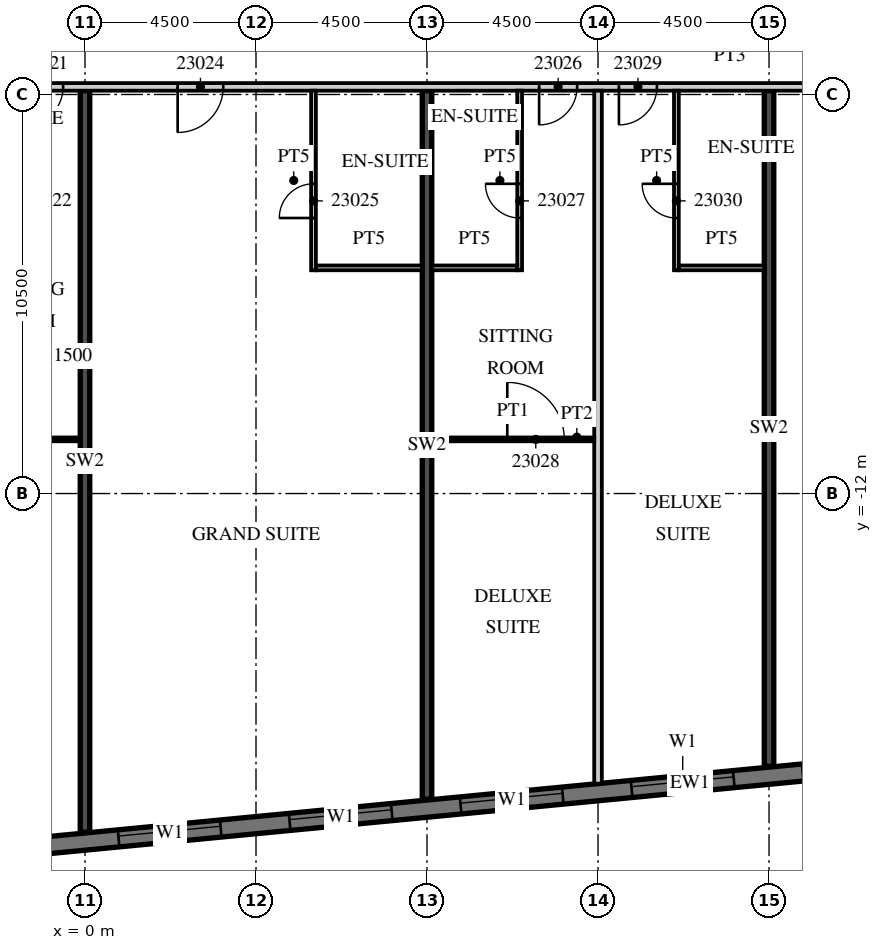
"""IFC4 building model, lengths in metres.
Left out: names, types, materials, properties, quantities, classifications, styles, units other than length and angle.
Written with IfcOpenShell. Run it as: python <this file> out.ifc"""

import sys

from ifc_helpers import new_model, si_unit, direction, frame, frame_2d, origin, place, context, subcontext, project, spatial, rectangle, extrude, element, fill, save


model = new_model("IFC4")
c1 = context("Model", 3, precision=1e-05, world=origin(), true_north=direction((0.0, 1.0)))
c2 = subcontext(c1, "Body", "Model", "MODEL_VIEW")
j1 = project(units=[si_unit("LENGTHUNIT", "METRE"), si_unit("PLANEANGLEUNIT", "RADIAN")], contexts=[c1])
p1 = place(None, origin())
s1 = spatial("IfcSite", under=j1, at=p1, CompositionType="ELEMENT")
p2 = place(p1, origin())
s2 = spatial("IfcBuilding", under=s1, at=p2, CompositionType="ELEMENT")
p3 = place(p2, frame((0.0, 0.0, 110.8)))
s3 = spatial("IfcBuildingStorey", under=s2, at=p3, CompositionType="ELEMENT", Elevation=110.8)
p4 = place(p3, frame((0.0, -20.91, 0.0), z_axis=(0.0, 0.0, 1.0), x_axis=(0.0, 1.0, 0.0)))
e1 = element("IfcWall", 1, at=p4, inside=s3, PredefinedType="SHEAR", context=c2, shape_type="SweptSolid", body=[
    extrude(rectangle(XDim=19.51, YDim=0.25, at=frame_2d((9.755, 0.0))), origin(), (0.0, 0.0, 1.0), 3.3),
])
p5 = place(p3, frame((9.0, -20.044, 0.0), z_axis=(0.0, 0.0, 1.0), x_axis=(0.0, 1.0, 0.0)))
e2 = element("IfcWall", 2, at=p5, inside=s3, PredefinedType="SHEAR", context=c2, shape_type="SweptSolid", body=[
    extrude(rectangle(XDim=18.644, YDim=0.25, at=frame_2d((9.322, 0.0))), origin(), (0.0, 0.0, 1.0), 3.3),
])
p6 = place(p3, frame((18.0, -19.177, 0.0), z_axis=(0.0, 0.0, 1.0), x_axis=(0.0, 1.0, 0.0)))
e3 = element("IfcWall", 3, at=p6, inside=s3, PredefinedType="SHEAR", context=c2, shape_type="SweptSolid", body=[
    extrude(rectangle(XDim=17.777, YDim=0.25, at=frame_2d((8.889, 0.0))), origin(), (0.0, 0.0, 1.0), 3.3),
])
p7 = place(p3, frame((-13.521, -22.46, 0.0), z_axis=(0.0, 0.0, 1.0), x_axis=(0.995396096335, 0.095846812164, 0.0)))
e4 = element("IfcWall", 4, at=p7, inside=s3, PredefinedType="SOLIDWALL", context=c2, shape_type="SweptSolid", body=[
    extrude(rectangle(XDim=59.151, YDim=0.45, at=frame_2d((29.575, 0.0))), origin(), (0.0, 0.0, 1.0), 3.02),
])
p8 = place(p7, frame((0.91, 0.0, 0.45)))
e5 = element("IfcOpeningElement", 5, at=p8, cuts=e4, PredefinedType="OPENING", context=c2, shape_type="SweptSolid", body=[
    extrude(rectangle(XDim=2.7, YDim=2.25, at=frame_2d((1.35, 1.125))), frame((0.0, 0.235, 0.0), z_axis=(0.0, -1.0, 0.0), x_axis=(1.0, 0.0, 0.0)), (0.0, 0.0, 1.0), 0.47),
])
p9 = place(p7, frame((5.431, 0.0, 0.45)))
e6 = element("IfcOpeningElement", 6, at=p9, cuts=e4, PredefinedType="OPENING", context=c2, shape_type="SweptSolid", body=[
    extrude(rectangle(XDim=2.7, YDim=2.25, at=frame_2d((1.35, 1.125))), frame((0.0, 0.235, 0.0), z_axis=(0.0, -1.0, 0.0), x_axis=(1.0, 0.0, 0.0)), (0.0, 0.0, 1.0), 0.47),
])
p10 = place(p7, frame((9.952, 0.0, 0.45)))
e7 = element("IfcOpeningElement", 7, at=p10, cuts=e4, PredefinedType="OPENING", context=c2, shape_type="SweptSolid", body=[
    extrude(rectangle(XDim=2.7, YDim=2.25, at=frame_2d((1.35, 1.125))), frame((0.0, 0.235, 0.0), z_axis=(0.0, -1.0, 0.0), x_axis=(1.0, 0.0, 0.0)), (0.0, 0.0, 1.0), 0.47),
])
p11 = place(p7, frame((14.473, 0.0, 0.45)))
e8 = element("IfcOpeningElement", 8, at=p11, cuts=e4, PredefinedType="OPENING", context=c2, shape_type="SweptSolid", body=[
    extrude(rectangle(XDim=2.7, YDim=2.25, at=frame_2d((1.35, 1.125))), frame((0.0, 0.235, 0.0), z_axis=(0.0, -1.0, 0.0), x_axis=(1.0, 0.0, 0.0)), (0.0, 0.0, 1.0), 0.47),
])
p12 = place(p7, frame((18.994, 0.0, 0.45)))
e9 = element("IfcOpeningElement", 9, at=p12, cuts=e4, PredefinedType="OPENING", context=c2, shape_type="SweptSolid", body=[
    extrude(rectangle(XDim=2.7, YDim=2.25, at=frame_2d((1.35, 1.125))), frame((0.0, 0.235, 0.0), z_axis=(0.0, -1.0, 0.0), x_axis=(1.0, 0.0, 0.0)), (0.0, 0.0, 1.0), 0.47),
])
p13 = place(p7, frame((23.514, 0.0, 0.45)))
e10 = element("IfcOpeningElement", 10, at=p13, cuts=e4, PredefinedType="OPENING", context=c2, shape_type="SweptSolid", body=[
    extrude(rectangle(XDim=2.7, YDim=2.25, at=frame_2d((1.35, 1.125))), frame((0.0, 0.235, 0.0), z_axis=(0.0, -1.0, 0.0), x_axis=(1.0, 0.0, 0.0)), (0.0, 0.0, 1.0), 0.47),
])
p14 = place(p7, frame((28.035, 0.0, 0.45)))
e11 = element("IfcOpeningElement", 11, at=p14, cuts=e4, PredefinedType="OPENING", context=c2, shape_type="SweptSolid", body=[
    extrude(rectangle(XDim=2.7, YDim=2.25, at=frame_2d((1.35, 1.125))), frame((0.0, 0.235, 0.0), z_axis=(0.0, -1.0, 0.0), x_axis=(1.0, 0.0, 0.0)), (0.0, 0.0, 1.0), 0.47),
])
p15 = place(p7, frame((32.556, 0.0, 0.45)))
e12 = element("IfcOpeningElement", 12, at=p15, cuts=e4, PredefinedType="OPENING", context=c2, shape_type="SweptSolid", body=[
    extrude(rectangle(XDim=2.7, YDim=2.25, at=frame_2d((1.35, 1.125))), frame((0.0, 0.235, 0.0), z_axis=(0.0, -1.0, 0.0), x_axis=(1.0, 0.0, 0.0)), (0.0, 0.0, 1.0), 0.47),
])
p16 = place(p7, frame((37.077, 0.0, 0.45)))
e13 = element("IfcOpeningElement", 13, at=p16, cuts=e4, PredefinedType="OPENING", context=c2, shape_type="SweptSolid", body=[
    extrude(rectangle(XDim=2.7, YDim=2.25, at=frame_2d((1.35, 1.125))), frame((0.0, 0.235, 0.0), z_axis=(0.0, -1.0, 0.0), x_axis=(1.0, 0.0, 0.0)), (0.0, 0.0, 1.0), 0.47),
])
p17 = place(p7, frame((41.598, 0.0, 0.45)))
e14 = element("IfcOpeningElement", 14, at=p17, cuts=e4, PredefinedType="OPENING", context=c2, shape_type="SweptSolid", body=[
    extrude(rectangle(XDim=2.7, YDim=2.25, at=frame_2d((1.35, 1.125))), frame((0.0, 0.235, 0.0), z_axis=(0.0, -1.0, 0.0), x_axis=(1.0, 0.0, 0.0)), (0.0, 0.0, 1.0), 0.47),
])
p18 = place(p7, frame((46.118, 0.0, 0.45)))
e15 = element("IfcOpeningElement", 15, at=p18, cuts=e4, PredefinedType="OPENING", context=c2, shape_type="SweptSolid", body=[
    extrude(rectangle(XDim=2.7, YDim=2.25, at=frame_2d((1.35, 1.125))), frame((0.0, 0.235, 0.0), z_axis=(0.0, -1.0, 0.0), x_axis=(1.0, 0.0, 0.0)), (0.0, 0.0, 1.0), 0.47),
])
p19 = place(p7, frame((50.639, 0.0, 0.45)))
e16 = element("IfcOpeningElement", 16, at=p19, cuts=e4, PredefinedType="OPENING", context=c2, shape_type="SweptSolid", body=[
    extrude(rectangle(XDim=2.7, YDim=2.25, at=frame_2d((1.35, 1.125))), frame((0.0, 0.235, 0.0), z_axis=(0.0, -1.0, 0.0), x_axis=(1.0, 0.0, 0.0)), (0.0, 0.0, 1.0), 0.47),
])
p20 = place(p7, frame((55.15, 0.0, 0.45)))
e17 = element("IfcOpeningElement", 17, at=p20, cuts=e4, PredefinedType="OPENING", context=c2, shape_type="SweptSolid", body=[
    extrude(rectangle(XDim=2.7, YDim=2.25, at=frame_2d((1.35, 1.125))), frame((0.0, 0.235, 0.0), z_axis=(0.0, -1.0, 0.0), x_axis=(1.0, 0.0, 0.0)), (0.0, 0.0, 1.0), 0.47),
])
p21 = place(p3, frame((-13.5, -1.3, 0.0), z_axis=(0.0, 0.0, 1.0), x_axis=(1.0, 0.0, 0.0)))
e18 = element("IfcWall", 18, at=p21, inside=s3, PredefinedType="PARTITIONING", context=c2, shape_type="SweptSolid", body=[
    extrude(rectangle(XDim=60.932, YDim=0.2, at=frame_2d((30.466, 0.0))), origin(), (0.0, 0.0, 1.0), 3.02),
])
p22 = place(p21, frame((0.575, 0.0, 0.0)))
e19 = element("IfcOpeningElement", 19, at=p22, cuts=e18, PredefinedType="OPENING", context=c2, shape_type="SweptSolid", body=[
    extrude(rectangle(XDim=1.0, YDim=2.1, at=frame_2d((0.5, 1.05))), frame((0.0, 0.11, 0.0), z_axis=(0.0, -1.0, 0.0), x_axis=(1.0, 0.0, 0.0)), (0.0, 0.0, 1.0), 0.22),
])
p23 = place(p21, frame((5.075, 0.0, 0.0)))
e20 = element("IfcOpeningElement", 20, at=p23, cuts=e18, PredefinedType="OPENING", context=c2, shape_type="SweptSolid", body=[
    extrude(rectangle(XDim=1.0, YDim=2.1, at=frame_2d((0.5, 1.05))), frame((0.0, 0.11, 0.0), z_axis=(0.0, -1.0, 0.0), x_axis=(1.0, 0.0, 0.0)), (0.0, 0.0, 1.0), 0.22),
])
p24 = place(p21, frame((11.925, 0.0, 0.0)))
e21 = element("IfcOpeningElement", 21, at=p24, cuts=e18, PredefinedType="OPENING", context=c2, shape_type="SweptSolid", body=[
    extrude(rectangle(XDim=1.0, YDim=2.1, at=frame_2d((0.5, 1.05))), frame((0.0, 0.11, 0.0), z_axis=(0.0, -1.0, 0.0), x_axis=(1.0, 0.0, 0.0)), (0.0, 0.0, 1.0), 0.22),
])
p25 = place(p21, frame((15.938, 0.0, 0.0)))
e22 = element("IfcOpeningElement", 22, at=p25, cuts=e18, PredefinedType="OPENING", context=c2, shape_type="SweptSolid", body=[
    extrude(rectangle(XDim=1.2, YDim=2.1, at=frame_2d((0.6, 1.05))), frame((0.0, 0.11, 0.0), z_axis=(0.0, -1.0, 0.0), x_axis=(1.0, 0.0, 0.0)), (0.0, 0.0, 1.0), 0.22),
])
p26 = place(p21, frame((25.45, 0.0, 0.0)))
e23 = element("IfcOpeningElement", 23, at=p26, cuts=e18, PredefinedType="OPENING", context=c2, shape_type="SweptSolid", body=[
    extrude(rectangle(XDim=1.0, YDim=2.1, at=frame_2d((0.5, 1.05))), frame((0.0, 0.11, 0.0), z_axis=(0.0, -1.0, 0.0), x_axis=(1.0, 0.0, 0.0)), (0.0, 0.0, 1.0), 0.22),
])
p27 = place(p21, frame((27.55, 0.0, 0.0)))
e24 = element("IfcOpeningElement", 24, at=p27, cuts=e18, PredefinedType="OPENING", context=c2, shape_type="SweptSolid", body=[
    extrude(rectangle(XDim=1.0, YDim=2.1, at=frame_2d((0.5, 1.05))), frame((0.0, 0.11, 0.0), z_axis=(0.0, -1.0, 0.0), x_axis=(1.0, 0.0, 0.0)), (0.0, 0.0, 1.0), 0.22),
])
p28 = place(p21, frame((33.938, 0.0, 0.0)))
e25 = element("IfcOpeningElement", 25, at=p28, cuts=e18, PredefinedType="OPENING", context=c2, shape_type="SweptSolid", body=[
    extrude(rectangle(XDim=1.2, YDim=2.1, at=frame_2d((0.6, 1.05))), frame((0.0, 0.11, 0.0), z_axis=(0.0, -1.0, 0.0), x_axis=(1.0, 0.0, 0.0)), (0.0, 0.0, 1.0), 0.22),
])
p29 = place(p21, frame((45.862, 0.0, 0.0)))
e26 = element("IfcOpeningElement", 26, at=p29, cuts=e18, PredefinedType="OPENING", context=c2, shape_type="SweptSolid", body=[
    extrude(rectangle(XDim=1.2, YDim=2.1, at=frame_2d((0.6, 1.05))), frame((0.0, 0.11, 0.0), z_axis=(0.0, -1.0, 0.0), x_axis=(1.0, 0.0, 0.0)), (0.0, 0.0, 1.0), 0.22),
])
p30 = place(p21, frame((52.425, 0.0, 0.0)))
e27 = element("IfcOpeningElement", 27, at=p30, cuts=e18, PredefinedType="OPENING", context=c2, shape_type="SweptSolid", body=[
    extrude(rectangle(XDim=1.0, YDim=2.1, at=frame_2d((0.5, 1.05))), frame((0.0, 0.11, 0.0), z_axis=(0.0, -1.0, 0.0), x_axis=(1.0, 0.0, 0.0)), (0.0, 0.0, 1.0), 0.22),
])
p31 = place(p21, frame((56.95, 0.0, 0.0)))
e28 = element("IfcOpeningElement", 28, at=p31, cuts=e18, PredefinedType="OPENING", context=c2, shape_type="SweptSolid", body=[
    extrude(rectangle(XDim=1.0, YDim=2.1, at=frame_2d((0.5, 1.05))), frame((0.0, 0.11, 0.0), z_axis=(0.0, -1.0, 0.0), x_axis=(1.0, 0.0, 0.0)), (0.0, 0.0, 1.0), 0.22),
])
p32 = place(p21, frame((59.882, 0.0, 0.0)))
e29 = element("IfcOpeningElement", 29, at=p32, cuts=e18, PredefinedType="OPENING", context=c2, shape_type="SweptSolid", body=[
    extrude(rectangle(XDim=0.9, YDim=2.1, at=frame_2d((0.45, 1.05))), frame((0.0, 0.11, 0.0), z_axis=(0.0, -1.0, 0.0), x_axis=(1.0, 0.0, 0.0)), (0.0, 0.0, 1.0), 0.22),
])
p33 = place(p3, frame((-4.4, -10.575, 0.0), z_axis=(0.0, 0.0, 1.0), x_axis=(1.0, 0.0, 0.0)))
e30 = element("IfcWall", 30, at=p33, inside=s3, PredefinedType="PARTITIONING", context=c2, shape_type="SweptSolid", body=[
    extrude(rectangle(XDim=4.275, YDim=0.1, at=frame_2d((2.137, 0.0))), origin(), (0.0, 0.0, 1.0), 3.02),
])
p34 = place(p33, frame((1.988, 0.0, 0.0)))
e31 = element("IfcOpeningElement", 31, at=p34, cuts=e30, PredefinedType="OPENING", context=c2, shape_type="SweptSolid", body=[
    extrude(rectangle(XDim=1.5, YDim=2.1, at=frame_2d((0.75, 1.05))), frame((0.0, 0.06, 0.0), z_axis=(0.0, -1.0, 0.0), x_axis=(1.0, 0.0, 0.0)), (0.0, 0.0, 1.0), 0.12),
])
p35 = place(p3, frame((6.013, -6.125, 0.0), z_axis=(0.0, 0.0, 1.0), x_axis=(0.0, 1.0, 0.0)))
e32 = element("IfcWall", 32, at=p35, inside=s3, PredefinedType="PARTITIONING", context=c2, shape_type="SweptSolid", body=[
    extrude(rectangle(XDim=4.725, YDim=0.125, at=frame_2d((2.363, 0.0))), origin(), (0.0, 0.0, 1.0), 3.02),
])
p36 = place(p35, frame((1.375, 0.0, 0.0)))
e33 = element("IfcOpeningElement", 33, at=p36, cuts=e32, PredefinedType="OPENING", context=c2, shape_type="SweptSolid", body=[
    extrude(rectangle(XDim=0.9, YDim=2.1, at=frame_2d((0.45, 1.05))), frame((0.0, 0.073, 0.0), z_axis=(0.0, -1.0, 0.0), x_axis=(1.0, 0.0, 0.0)), (0.0, 0.0, 1.0), 0.145),
])
p37 = place(p3, frame((6.075, -6.062, 0.0), z_axis=(0.0, 0.0, 1.0), x_axis=(1.0, 0.0, 0.0)))
e34 = element("IfcWall", 34, at=p37, inside=s3, PredefinedType="PARTITIONING", context=c2, shape_type="SweptSolid", body=[
    extrude(rectangle(XDim=2.8, YDim=0.125, at=frame_2d((1.4, 0.0))), origin(), (0.0, 0.0, 1.0), 3.02),
])
p38 = place(p3, frame((13.5, -19.633, 0.0), z_axis=(0.0, 0.0, 1.0), x_axis=(0.0, 1.0, 0.0)))
e35 = element("IfcWall", 35, at=p38, inside=s3, PredefinedType="PARTITIONING", context=c2, shape_type="SweptSolid", body=[
    extrude(rectangle(XDim=18.233, YDim=0.2, at=frame_2d((9.117, 0.0))), origin(), (0.0, 0.0, 1.0), 3.02),
])
p39 = place(p3, frame((11.438, -6.125, 0.0), z_axis=(0.0, 0.0, 1.0), x_axis=(0.0, 1.0, 0.0)))
e36 = element("IfcWall", 36, at=p39, inside=s3, PredefinedType="PARTITIONING", context=c2, shape_type="SweptSolid", body=[
    extrude(rectangle(XDim=4.725, YDim=0.125, at=frame_2d((2.363, 0.0))), origin(), (0.0, 0.0, 1.0), 3.02),
])
p40 = place(p39, frame((1.375, 0.0, 0.0)))
e37 = element("IfcOpeningElement", 37, at=p40, cuts=e36, PredefinedType="OPENING", context=c2, shape_type="SweptSolid", body=[
    extrude(rectangle(XDim=0.9, YDim=2.1, at=frame_2d((0.45, 1.05))), frame((0.0, 0.073, 0.0), z_axis=(0.0, -1.0, 0.0), x_axis=(1.0, 0.0, 0.0)), (0.0, 0.0, 1.0), 0.145),
])
p41 = place(p3, frame((9.125, -6.062, 0.0), z_axis=(0.0, 0.0, 1.0), x_axis=(1.0, 0.0, 0.0)))
e38 = element("IfcWall", 38, at=p41, inside=s3, PredefinedType="PARTITIONING", context=c2, shape_type="SweptSolid", body=[
    extrude(rectangle(XDim=2.25, YDim=0.125, at=frame_2d((1.125, 0.0))), origin(), (0.0, 0.0, 1.0), 3.02),
])
p42 = place(p3, frame((9.125, -10.575, 0.0), z_axis=(0.0, 0.0, 1.0), x_axis=(1.0, 0.0, 0.0)))
e39 = element("IfcWall", 39, at=p42, inside=s3, PredefinedType="PARTITIONING", context=c2, shape_type="SweptSolid", body=[
    extrude(rectangle(XDim=4.275, YDim=0.1, at=frame_2d((2.137, 0.0))), origin(), (0.0, 0.0, 1.0), 3.02),
])
p43 = place(p42, frame((1.987, 0.0, 0.0)))
e40 = element("IfcOpeningElement", 40, at=p43, cuts=e39, PredefinedType="OPENING", context=c2, shape_type="SweptSolid", body=[
    extrude(rectangle(XDim=1.5, YDim=2.1, at=frame_2d((0.75, 1.05))), frame((0.0, 0.06, 0.0), z_axis=(0.0, -1.0, 0.0), x_axis=(1.0, 0.0, 0.0)), (0.0, 0.0, 1.0), 0.12),
])
p44 = place(p3, frame((15.562, -6.125, 0.0), z_axis=(0.0, 0.0, 1.0), x_axis=(0.0, 1.0, 0.0)))
e41 = element("IfcWall", 41, at=p44, inside=s3, PredefinedType="PARTITIONING", context=c2, shape_type="SweptSolid", body=[
    extrude(rectangle(XDim=4.725, YDim=0.125, at=frame_2d((2.363, 0.0))), origin(), (0.0, 0.0, 1.0), 3.02),
])
p45 = place(p44, frame((1.375, 0.0, 0.0)))
e42 = element("IfcOpeningElement", 42, at=p45, cuts=e41, PredefinedType="OPENING", context=c2, shape_type="SweptSolid", body=[
    extrude(rectangle(XDim=0.9, YDim=2.1, at=frame_2d((0.45, 1.05))), frame((0.0, 0.073, 0.0), z_axis=(0.0, -1.0, 0.0), x_axis=(1.0, 0.0, 0.0)), (0.0, 0.0, 1.0), 0.145),
])
p46 = place(p3, frame((15.625, -6.062, 0.0), z_axis=(0.0, 0.0, 1.0), x_axis=(1.0, 0.0, 0.0)))
e43 = element("IfcWall", 43, at=p46, inside=s3, PredefinedType="PARTITIONING", context=c2, shape_type="SweptSolid", body=[
    extrude(rectangle(XDim=2.25, YDim=0.125, at=frame_2d((1.125, 0.0))), origin(), (0.0, 0.0, 1.0), 3.02),
])
p47 = place(p11, origin())
e44 = element("IfcWindow", 44, at=p47, inside=s3, PartitioningType="SINGLE_PANEL", PredefinedType="WINDOW", context=c2, shape_type="SweptSolid", body=[
    extrude(rectangle(XDim=2.7, YDim=2.25, at=frame_2d((1.35, 1.125))), frame((0.0, 0.09, 0.0), z_axis=(0.0, -1.0, 0.0), x_axis=(1.0, 0.0, 0.0)), (0.0, 0.0, 1.0), 0.06),
])
fill(e8, e44)
p48 = place(p12, origin())
e45 = element("IfcWindow", 45, at=p48, inside=s3, PartitioningType="SINGLE_PANEL", PredefinedType="WINDOW", context=c2, shape_type="SweptSolid", body=[
    extrude(rectangle(XDim=2.7, YDim=2.25, at=frame_2d((1.35, 1.125))), frame((0.0, 0.09, 0.0), z_axis=(0.0, -1.0, 0.0), x_axis=(1.0, 0.0, 0.0)), (0.0, 0.0, 1.0), 0.06),
])
fill(e9, e45)
p49 = place(p13, origin())
e46 = element("IfcWindow", 46, at=p49, inside=s3, PartitioningType="SINGLE_PANEL", PredefinedType="WINDOW", context=c2, shape_type="SweptSolid", body=[
    extrude(rectangle(XDim=2.7, YDim=2.25, at=frame_2d((1.35, 1.125))), frame((0.0, 0.09, 0.0), z_axis=(0.0, -1.0, 0.0), x_axis=(1.0, 0.0, 0.0)), (0.0, 0.0, 1.0), 0.06),
])
fill(e10, e46)
p50 = place(p14, origin())
e47 = element("IfcWindow", 47, at=p50, inside=s3, PartitioningType="SINGLE_PANEL", PredefinedType="WINDOW", context=c2, shape_type="SweptSolid", body=[
    extrude(rectangle(XDim=2.7, YDim=2.25, at=frame_2d((1.35, 1.125))), frame((0.0, 0.09, 0.0), z_axis=(0.0, -1.0, 0.0), x_axis=(1.0, 0.0, 0.0)), (0.0, 0.0, 1.0), 0.06),
])
fill(e11, e47)
p51 = place(p24, origin())
e48 = element("IfcDoor", 48, at=p51, inside=s3, OperationType="SINGLE_SWING_LEFT", PredefinedType="DOOR", context=c2, shape_type="SweptSolid", body=[
    extrude(rectangle(XDim=1.0, YDim=2.1, at=frame_2d((0.5, 1.05))), frame((0.0, 0.025, 0.0), z_axis=(0.0, -1.0, 0.0), x_axis=(1.0, 0.0, 0.0)), (0.0, 0.0, 1.0), 0.05),
])
fill(e21, e48)
p52 = place(p25, origin())
e49 = element("IfcDoor", 49, at=p52, inside=s3, OperationType="SINGLE_SWING_LEFT", PredefinedType="DOOR", context=c2, shape_type="SweptSolid", body=[
    extrude(rectangle(XDim=1.2, YDim=2.1, at=frame_2d((0.6, 1.05))), frame((0.0, 0.025, 0.0), z_axis=(0.0, -1.0, 0.0), x_axis=(1.0, 0.0, 0.0)), (0.0, 0.0, 1.0), 0.05),
])
fill(e22, e49)
p53 = place(p36, origin())
e50 = element("IfcDoor", 50, at=p53, inside=s3, OperationType="SINGLE_SWING_LEFT", PredefinedType="DOOR", context=c2, shape_type="SweptSolid", body=[
    extrude(rectangle(XDim=0.9, YDim=2.1, at=frame_2d((0.45, 1.05))), frame((0.0, 0.025, 0.0), z_axis=(0.0, -1.0, 0.0), x_axis=(1.0, 0.0, 0.0)), (0.0, 0.0, 1.0), 0.05),
])
fill(e33, e50)
p54 = place(p26, origin())
e51 = element("IfcDoor", 51, at=p54, inside=s3, OperationType="SINGLE_SWING_LEFT", PredefinedType="DOOR", context=c2, shape_type="SweptSolid", body=[
    extrude(rectangle(XDim=1.0, YDim=2.1, at=frame_2d((0.5, 1.05))), frame((0.0, 0.025, 0.0), z_axis=(0.0, -1.0, 0.0), x_axis=(1.0, 0.0, 0.0)), (0.0, 0.0, 1.0), 0.05),
])
fill(e23, e51)
p55 = place(p40, origin())
e52 = element("IfcDoor", 52, at=p55, inside=s3, OperationType="SINGLE_SWING_RIGHT", PredefinedType="DOOR", context=c2, shape_type="SweptSolid", body=[
    extrude(rectangle(XDim=0.9, YDim=2.1, at=frame_2d((0.45, 1.05))), frame((0.0, 0.025, 0.0), z_axis=(0.0, -1.0, 0.0), x_axis=(1.0, 0.0, 0.0)), (0.0, 0.0, 1.0), 0.05),
])
fill(e37, e52)
p56 = place(p43, origin())
e53 = element("IfcDoor", 53, at=p56, inside=s3, OperationType="SINGLE_SWING_LEFT", PredefinedType="DOOR", context=c2, shape_type="SweptSolid", body=[
    extrude(rectangle(XDim=1.5, YDim=2.1, at=frame_2d((0.75, 1.05))), frame((0.0, 0.025, 0.0), z_axis=(0.0, -1.0, 0.0), x_axis=(1.0, 0.0, 0.0)), (0.0, 0.0, 1.0), 0.05),
])
fill(e40, e53)
p57 = place(p27, origin())
e54 = element("IfcDoor", 54, at=p57, inside=s3, OperationType="SINGLE_SWING_LEFT", PredefinedType="DOOR", context=c2, shape_type="SweptSolid", body=[
    extrude(rectangle(XDim=1.0, YDim=2.1, at=frame_2d((0.5, 1.05))), frame((0.0, 0.025, 0.0), z_axis=(0.0, -1.0, 0.0), x_axis=(1.0, 0.0, 0.0)), (0.0, 0.0, 1.0), 0.05),
])
fill(e24, e54)
p58 = place(p45, origin())
e55 = element("IfcDoor", 55, at=p58, inside=s3, OperationType="SINGLE_SWING_RIGHT", PredefinedType="DOOR", context=c2, shape_type="SweptSolid", body=[
    extrude(rectangle(XDim=0.9, YDim=2.1, at=frame_2d((0.45, 1.05))), frame((0.0, 0.025, 0.0), z_axis=(0.0, -1.0, 0.0), x_axis=(1.0, 0.0, 0.0)), (0.0, 0.0, 1.0), 0.05),
])
fill(e42, e55)
save(model, sys.argv[1])
